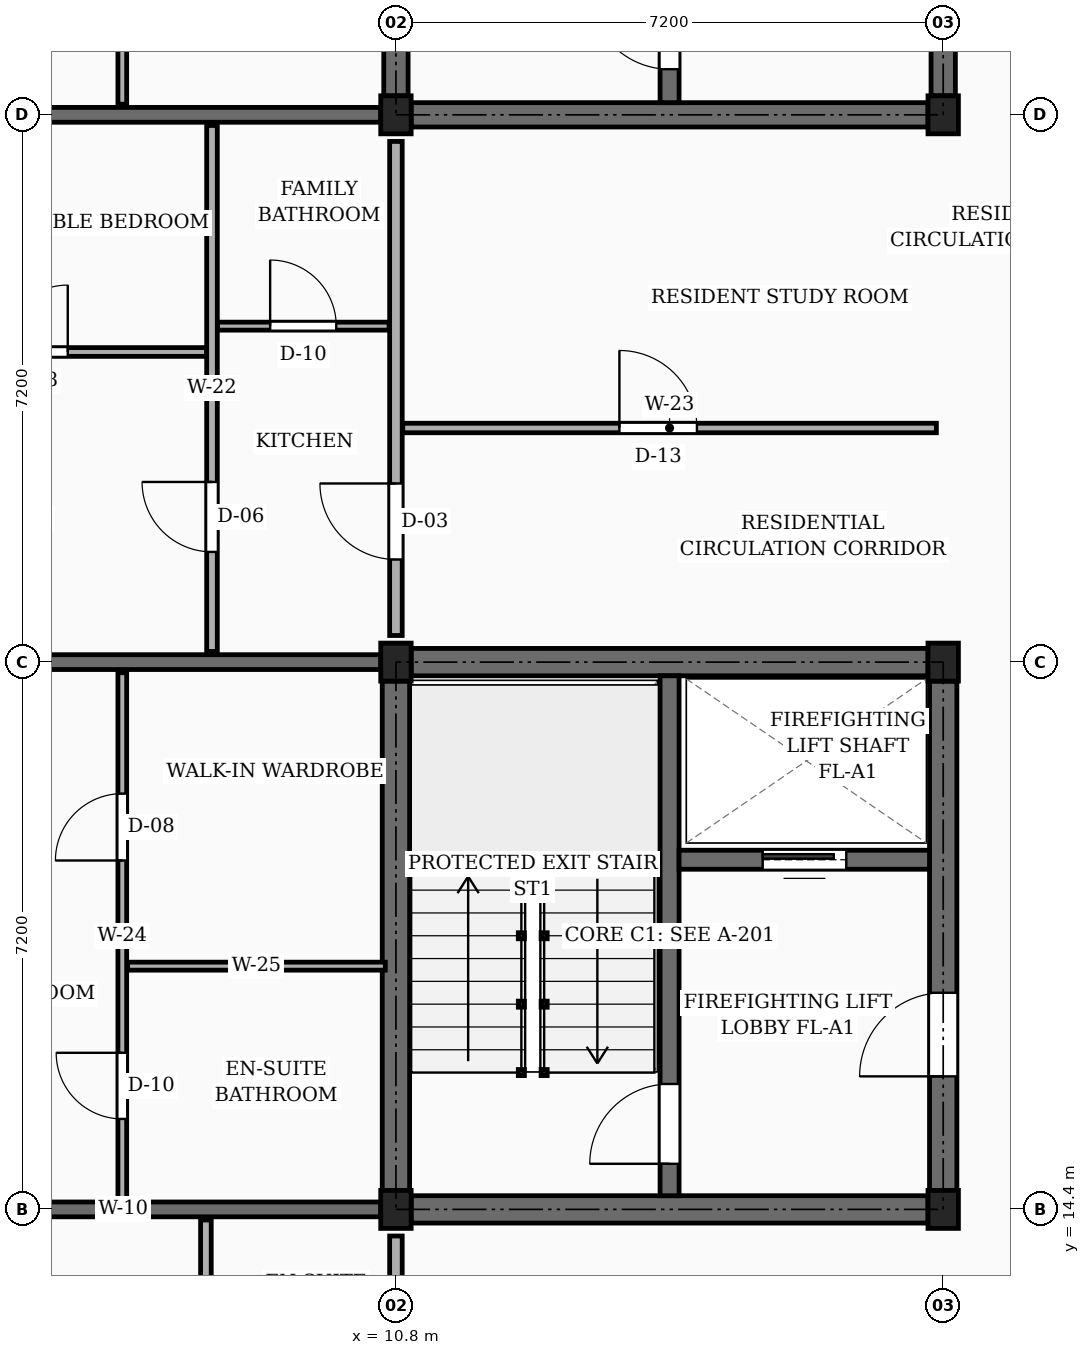
"""IFC4 building model, lengths in metres.
Left out: names, types, materials, properties, quantities, classifications, styles, units other than length and angle.
Written with IfcOpenShell. Run it as: python <this file> out.ifc"""

import sys

from ifc_helpers import new_model, si_unit, direction, frame, frame_2d, origin, origin_2d, place, context, subcontext, project, spatial, rectangle, extrude, element, fill, save


model = new_model("IFC4")
c1 = context("Model", 3, precision=1e-05, world=origin(), true_north=direction((0.0, 1.0)))
c2 = subcontext(c1, "Body", "Model", "MODEL_VIEW")
j1 = project(units=[si_unit("LENGTHUNIT", "METRE"), si_unit("PLANEANGLEUNIT", "RADIAN")], contexts=[c1])
p1 = place(None, origin())
s1 = spatial("IfcSite", under=j1, at=p1, CompositionType="ELEMENT")
p2 = place(p1, origin())
s2 = spatial("IfcBuilding", under=s1, at=p2, CompositionType="ELEMENT")
p3 = place(p2, frame((0.0, 0.0, 39.15)))
s3 = spatial("IfcBuildingStorey", under=s2, at=p3, CompositionType="ELEMENT", Elevation=39.15)
for number, where, z_axis, x_axis in (
    (1, (10.8, 14.4, 0.0), (0.0, 0.0, 1.0), (1.0, 0.0, 0.0)),
    (2, (10.8, 21.6, 0.0), (0.0, 0.0, 1.0), (1.0, 0.0, 0.0)),
    (3, (10.8, 28.8, 0.0), (0.0, 0.0, 1.0), (1.0, 0.0, 0.0)),
    (4, (18.0, 14.4, 0.0), (0.0, 0.0, 1.0), (1.0, 0.0, 0.0)),
    (5, (18.0, 21.6, 0.0), (0.0, 0.0, 1.0), (1.0, 0.0, 0.0)),
    (6, (18.0, 28.8, 0.0), (0.0, 0.0, 1.0), (1.0, 0.0, 0.0)),
):
    element("IfcColumn", number, at=place(p3, frame(where, z_axis=z_axis, x_axis=x_axis)), inside=s3, PredefinedType="COLUMN", context=c2, shape_type="SweptSolid", body=[
        extrude(rectangle(XDim=0.4, YDim=0.5, at=origin_2d()), origin(), (0.0, 0.0, 1.0), 3.15),
    ])
p4 = place(p3, frame((3.825, 14.4, 0.0), z_axis=(0.0, 0.0, 1.0), x_axis=(1.0, 0.0, 0.0)))
e7 = element("IfcWall", 7, at=p4, inside=s3, PredefinedType="SOLIDWALL", context=c2, shape_type="SweptSolid", body=[
    extrude(rectangle(XDim=6.775, YDim=0.195, at=frame_2d((3.388, 0.0))), origin(), (0.0, 0.0, 1.0), 2.17),
])
p5 = place(p4, frame((1.35, 0.0, 0.0)))
e8 = element("IfcOpeningElement", 8, at=p5, cuts=e7, PredefinedType="OPENING", context=c2, shape_type="SweptSolid", body=[
    extrude(rectangle(XDim=0.98, YDim=2.12, at=frame_2d((0.49, 1.06))), frame((0.0, 0.107, 0.0), z_axis=(0.0, -1.0, 0.0), x_axis=(1.0, 0.0, 0.0)), (0.0, 0.0, 1.0), 0.215),
])
p6 = place(p3, frame((3.825, 21.6, 0.0), z_axis=(0.0, 0.0, 1.0), x_axis=(1.0, 0.0, 0.0)))
e9 = element("IfcWall", 9, at=p6, inside=s3, PredefinedType="SOLIDWALL", context=c2, shape_type="SweptSolid", body=[
    extrude(rectangle(XDim=6.775, YDim=0.195, at=frame_2d((3.388, 0.0))), origin(), (0.0, 0.0, 1.0), 2.17),
])
p7 = place(p3, frame((3.825, 28.8, 0.0), z_axis=(0.0, 0.0, 1.0), x_axis=(1.0, 0.0, 0.0)))
e10 = element("IfcWall", 10, at=p7, inside=s3, PredefinedType="SOLIDWALL", context=c2, shape_type="SweptSolid", body=[
    extrude(rectangle(XDim=6.775, YDim=0.195, at=frame_2d((3.388, 0.0))), origin(), (0.0, 0.0, 1.0), 2.17),
])
p8 = place(p7, frame((1.35, 0.0, 0.0)))
e11 = element("IfcOpeningElement", 11, at=p8, cuts=e10, PredefinedType="OPENING", context=c2, shape_type="SweptSolid", body=[
    extrude(rectangle(XDim=0.98, YDim=2.12, at=frame_2d((0.49, 1.06))), frame((0.0, 0.107, 0.0), z_axis=(0.0, -1.0, 0.0), x_axis=(1.0, 0.0, 0.0)), (0.0, 0.0, 1.0), 0.215),
])
p9 = place(p3, frame((10.8, 14.65, 0.0), z_axis=(0.0, 0.0, 1.0), x_axis=(0.0, 1.0, 0.0)))
e12 = element("IfcWall", 12, at=p9, inside=s3, PredefinedType="SHEAR", context=c2, shape_type="SweptSolid", body=[
    extrude(rectangle(XDim=6.7, YDim=0.36, at=frame_2d((3.35, 0.0))), origin(), (0.0, 0.0, 1.0), 2.87),
])
p10 = place(p3, frame((11.0, 21.6, 0.0), z_axis=(0.0, 0.0, 1.0), x_axis=(1.0, 0.0, 0.0)))
e13 = element("IfcWall", 13, at=p10, inside=s3, PredefinedType="SHEAR", context=c2, shape_type="SweptSolid", body=[
    extrude(rectangle(XDim=6.8, YDim=0.36, at=frame_2d((3.4, 0.0))), origin(), (0.0, 0.0, 1.0), 2.87),
])
p11 = place(p3, frame((18.0, 14.65, 0.0), z_axis=(0.0, 0.0, 1.0), x_axis=(0.0, 1.0, 0.0)))
e14 = element("IfcWall", 14, at=p11, inside=s3, PredefinedType="SHEAR", context=c2, shape_type="SweptSolid", body=[
    extrude(rectangle(XDim=6.7, YDim=0.36, at=frame_2d((3.35, 0.0))), origin(), (0.0, 0.0, 1.0), 2.87),
])
p12 = place(p11, frame((1.5, 0.0, 0.0)))
e15 = element("IfcOpeningElement", 15, at=p12, cuts=e14, PredefinedType="OPENING", context=c2, shape_type="SweptSolid", body=[
    extrude(rectangle(XDim=1.1, YDim=2.15, at=frame_2d((0.55, 1.075))), frame((0.0, 0.19, 0.0), z_axis=(0.0, -1.0, 0.0), x_axis=(1.0, 0.0, 0.0)), (0.0, 0.0, 1.0), 0.38),
])
p13 = place(p3, frame((11.0, 14.4, 0.0), z_axis=(0.0, 0.0, 1.0), x_axis=(1.0, 0.0, 0.0)))
e16 = element("IfcWall", 16, at=p13, inside=s3, PredefinedType="SHEAR", context=c2, shape_type="SweptSolid", body=[
    extrude(rectangle(XDim=6.8, YDim=0.36, at=frame_2d((3.4, 0.0))), origin(), (0.0, 0.0, 1.0), 2.87),
])
p14 = place(p3, frame((14.4, 14.58, 0.0), z_axis=(0.0, 0.0, 1.0), x_axis=(0.0, 1.0, 0.0)))
e17 = element("IfcWall", 17, at=p14, inside=s3, PredefinedType="SHEAR", context=c2, shape_type="SweptSolid", body=[
    extrude(rectangle(XDim=6.84, YDim=0.25, at=frame_2d((3.42, 0.0))), origin(), (0.0, 0.0, 1.0), 2.87),
])
p15 = place(p14, frame((0.42, 0.0, 0.0)))
e18 = element("IfcOpeningElement", 18, at=p15, cuts=e17, PredefinedType="OPENING", context=c2, shape_type="SweptSolid", body=[
    extrude(rectangle(XDim=1.05, YDim=2.15, at=frame_2d((0.525, 1.075))), frame((0.0, 0.135, 0.0), z_axis=(0.0, -1.0, 0.0), x_axis=(1.0, 0.0, 0.0)), (0.0, 0.0, 1.0), 0.27),
])
p16 = place(p3, frame((14.525, 19.0, 0.0), z_axis=(0.0, 0.0, 1.0), x_axis=(1.0, 0.0, 0.0)))
e19 = element("IfcWall", 19, at=p16, inside=s3, PredefinedType="SHEAR", context=c2, shape_type="SweptSolid", body=[
    extrude(rectangle(XDim=3.295, YDim=0.25, at=frame_2d((1.647, 0.0))), origin(), (0.0, 0.0, 1.0), 2.87),
])
p17 = place(p16, frame((1.1, 0.0, 0.0)))
e20 = element("IfcOpeningElement", 20, at=p17, cuts=e19, PredefinedType="OPENING", context=c2, shape_type="SweptSolid", body=[
    extrude(rectangle(XDim=1.1, YDim=2.2, at=frame_2d((0.55, 1.1))), frame((0.0, 0.135, 0.0), z_axis=(0.0, -1.0, 0.0), x_axis=(1.0, 0.0, 0.0)), (0.0, 0.0, 1.0), 0.27),
])
p18 = place(p3, frame((10.8, 29.05, 0.0), z_axis=(0.0, 0.0, 1.0), x_axis=(0.0, 1.0, 0.0)))
e21 = element("IfcWall", 21, at=p18, inside=s3, PredefinedType="SHEAR", context=c2, shape_type="SweptSolid", body=[
    extrude(rectangle(XDim=6.7, YDim=0.32, at=frame_2d((3.35, 0.0))), origin(), (0.0, 0.0, 1.0), 2.87),
])
p19 = place(p3, frame((18.0, 29.05, 0.0), z_axis=(0.0, 0.0, 1.0), x_axis=(0.0, 1.0, 0.0)))
e22 = element("IfcWall", 22, at=p19, inside=s3, PredefinedType="SHEAR", context=c2, shape_type="SweptSolid", body=[
    extrude(rectangle(XDim=6.7, YDim=0.32, at=frame_2d((3.35, 0.0))), origin(), (0.0, 0.0, 1.0), 2.87),
])
p20 = place(p19, frame((1.5, 0.0, 0.0)))
e23 = element("IfcOpeningElement", 23, at=p20, cuts=e22, PredefinedType="OPENING", context=c2, shape_type="SweptSolid", body=[
    extrude(rectangle(XDim=1.1, YDim=2.15, at=frame_2d((0.55, 1.075))), frame((0.0, 0.17, 0.0), z_axis=(0.0, -1.0, 0.0), x_axis=(1.0, 0.0, 0.0)), (0.0, 0.0, 1.0), 0.34),
])
p21 = place(p3, frame((11.0, 28.8, 0.0), z_axis=(0.0, 0.0, 1.0), x_axis=(1.0, 0.0, 0.0)))
e24 = element("IfcWall", 24, at=p21, inside=s3, PredefinedType="SHEAR", context=c2, shape_type="SweptSolid", body=[
    extrude(rectangle(XDim=6.8, YDim=0.32, at=frame_2d((3.4, 0.0))), origin(), (0.0, 0.0, 1.0), 2.87),
])
p22 = place(p3, frame((14.4, 28.96, 0.0), z_axis=(0.0, 0.0, 1.0), x_axis=(0.0, 1.0, 0.0)))
e25 = element("IfcWall", 25, at=p22, inside=s3, PredefinedType="SHEAR", context=c2, shape_type="SweptSolid", body=[
    extrude(rectangle(XDim=6.88, YDim=0.25, at=frame_2d((3.44, 0.0))), origin(), (0.0, 0.0, 1.0), 2.87),
])
p23 = place(p22, frame((0.44, 0.0, 0.0)))
e26 = element("IfcOpeningElement", 26, at=p23, cuts=e25, PredefinedType="OPENING", context=c2, shape_type="SweptSolid", body=[
    extrude(rectangle(XDim=1.05, YDim=2.15, at=frame_2d((0.525, 1.075))), frame((0.0, 0.135, 0.0), z_axis=(0.0, -1.0, 0.0), x_axis=(1.0, 0.0, 0.0)), (0.0, 0.0, 1.0), 0.27),
])
p24 = place(p3, frame((10.8, 7.55, 0.0), z_axis=(0.0, 0.0, 1.0), x_axis=(0.0, 1.0, 0.0)))
e27 = element("IfcWall", 27, at=p24, inside=s3, PredefinedType="PARTITIONING", context=c2, shape_type="SweptSolid", body=[
    extrude(rectangle(XDim=6.5, YDim=0.165, at=frame_2d((3.25, 0.0))), origin(), (0.0, 0.0, 1.0), 2.305),
])
p25 = place(p24, frame((1.0, 0.0, 0.0)))
e28 = element("IfcOpeningElement", 28, at=p25, cuts=e27, PredefinedType="OPENING", context=c2, shape_type="SweptSolid", body=[
    extrude(rectangle(XDim=1.14, YDim=2.18, at=frame_2d((0.57, 1.09))), frame((0.0, 0.093, 0.0), z_axis=(0.0, -1.0, 0.0), x_axis=(1.0, 0.0, 0.0)), (0.0, 0.0, 1.0), 0.185),
])
p26 = place(p3, frame((10.8, 21.95, 0.0), z_axis=(0.0, 0.0, 1.0), x_axis=(0.0, 1.0, 0.0)))
e29 = element("IfcWall", 29, at=p26, inside=s3, PredefinedType="PARTITIONING", context=c2, shape_type="SweptSolid", body=[
    extrude(rectangle(XDim=6.5, YDim=0.165, at=frame_2d((3.25, 0.0))), origin(), (0.0, 0.0, 1.0), 2.305),
])
p27 = place(p26, frame((1.0, 0.0, 0.0)))
e30 = element("IfcOpeningElement", 30, at=p27, cuts=e29, PredefinedType="OPENING", context=c2, shape_type="SweptSolid", body=[
    extrude(rectangle(XDim=1.0, YDim=2.15, at=frame_2d((0.5, 1.075))), frame((0.0, 0.093, 0.0), z_axis=(0.0, -1.0, 0.0), x_axis=(1.0, 0.0, 0.0)), (0.0, 0.0, 1.0), 0.185),
])
p28 = place(p3, frame((8.3, 7.375, 0.0), z_axis=(0.0, 0.0, 1.0), x_axis=(0.0, 1.0, 0.0)))
e31 = element("IfcWall", 31, at=p28, inside=s3, PredefinedType="PARTITIONING", context=c2, shape_type="SweptSolid", body=[
    extrude(rectangle(XDim=6.885, YDim=0.14, at=frame_2d((3.442, 0.0))), origin(), (0.0, 0.0, 1.0), 2.305),
])
p29 = place(p28, frame((1.275, 0.0, 0.0)))
e32 = element("IfcOpeningElement", 32, at=p29, cuts=e31, PredefinedType="OPENING", context=c2, shape_type="SweptSolid", body=[
    extrude(rectangle(XDim=0.95, YDim=2.1, at=frame_2d((0.475, 1.05))), frame((0.0, 0.08, 0.0), z_axis=(0.0, -1.0, 0.0), x_axis=(1.0, 0.0, 0.0)), (0.0, 0.0, 1.0), 0.16),
])
p30 = place(p3, frame((7.2, 14.54, 0.0), z_axis=(0.0, 0.0, 1.0), x_axis=(0.0, 1.0, 0.0)))
e33 = element("IfcWall", 33, at=p30, inside=s3, PredefinedType="PARTITIONING", context=c2, shape_type="SweptSolid", body=[
    extrude(rectangle(XDim=6.92, YDim=0.115, at=frame_2d((3.46, 0.0))), origin(), (0.0, 0.0, 1.0), 2.305),
])
p31 = place(p30, frame((1.05, 0.0, 0.0)))
e34 = element("IfcOpeningElement", 34, at=p31, cuts=e33, PredefinedType="OPENING", context=c2, shape_type="SweptSolid", body=[
    extrude(rectangle(XDim=0.87, YDim=2.05, at=frame_2d((0.435, 1.025))), frame((0.0, 0.067, 0.0), z_axis=(0.0, -1.0, 0.0), x_axis=(1.0, 0.0, 0.0)), (0.0, 0.0, 1.0), 0.135),
])
p32 = place(p30, frame((4.45, 0.0, 0.0)))
e35 = element("IfcOpeningElement", 35, at=p32, cuts=e33, PredefinedType="OPENING", context=c2, shape_type="SweptSolid", body=[
    extrude(rectangle(XDim=0.88, YDim=2.08, at=frame_2d((0.44, 1.04))), frame((0.0, 0.067, 0.0), z_axis=(0.0, -1.0, 0.0), x_axis=(1.0, 0.0, 0.0)), (0.0, 0.0, 1.0), 0.135),
])
p33 = place(p3, frame((7.27, 17.6, 0.0), z_axis=(0.0, 0.0, 1.0), x_axis=(1.0, 0.0, 0.0)))
e36 = element("IfcWall", 36, at=p33, inside=s3, PredefinedType="PARTITIONING", context=c2, shape_type="SweptSolid", body=[
    extrude(rectangle(XDim=3.39, YDim=0.105, at=frame_2d((1.695, 0.0))), origin(), (0.0, 0.0, 1.0), 2.305),
])
p34 = place(p3, frame((10.89, 24.68, 0.0), z_axis=(0.0, 0.0, 1.0), x_axis=(1.0, 0.0, 0.0)))
e37 = element("IfcWall", 37, at=p34, inside=s3, PredefinedType="PARTITIONING", context=c2, shape_type="SweptSolid", body=[
    extrude(rectangle(XDim=7.02, YDim=0.125, at=frame_2d((3.51, 0.0))), origin(), (0.0, 0.0, 1.0), 2.305),
])
p35 = place(p34, frame((2.85, 0.0, 0.0)))
e38 = element("IfcOpeningElement", 38, at=p35, cuts=e37, PredefinedType="OPENING", context=c2, shape_type="SweptSolid", body=[
    extrude(rectangle(XDim=1.02, YDim=2.15, at=frame_2d((0.51, 1.075))), frame((0.0, 0.073, 0.0), z_axis=(0.0, -1.0, 0.0), x_axis=(1.0, 0.0, 0.0)), (0.0, 0.0, 1.0), 0.145),
])
p36 = place(p3, frame((3.775, 25.68, 0.0), z_axis=(0.0, 0.0, 1.0), x_axis=(1.0, 0.0, 0.0)))
e39 = element("IfcWall", 39, at=p36, inside=s3, PredefinedType="PARTITIONING", context=c2, shape_type="SweptSolid", body=[
    extrude(rectangle(XDim=4.535, YDim=0.115, at=frame_2d((2.268, 0.0))), origin(), (0.0, 0.0, 1.0), 2.305),
])
p37 = place(p36, frame((1.827, 0.0, 0.0)))
e40 = element("IfcOpeningElement", 40, at=p37, cuts=e39, PredefinedType="OPENING", context=c2, shape_type="SweptSolid", body=[
    extrude(rectangle(XDim=0.88, YDim=2.08, at=frame_2d((0.44, 1.04))), frame((0.0, 0.067, 0.0), z_axis=(0.0, -1.0, 0.0), x_axis=(1.0, 0.0, 0.0)), (0.0, 0.0, 1.0), 0.135),
])
p38 = place(p3, frame((8.45, 26.02, 0.0), z_axis=(0.0, 0.0, 1.0), x_axis=(1.0, 0.0, 0.0)))
e41 = element("IfcWall", 41, at=p38, inside=s3, PredefinedType="PARTITIONING", context=c2, shape_type="SweptSolid", body=[
    extrude(rectangle(XDim=2.26, YDim=0.105, at=frame_2d((1.13, 0.0))), origin(), (0.0, 0.0, 1.0), 2.305),
])
p39 = place(p38, frame((0.695, 0.0, 0.0)))
e42 = element("IfcOpeningElement", 42, at=p39, cuts=e41, PredefinedType="OPENING", context=c2, shape_type="SweptSolid", body=[
    extrude(rectangle(XDim=0.87, YDim=2.05, at=frame_2d((0.435, 1.025))), frame((0.0, 0.062, 0.0), z_axis=(0.0, -1.0, 0.0), x_axis=(1.0, 0.0, 0.0)), (0.0, 0.0, 1.0), 0.125),
])
p40 = place(p3, frame((8.38, 21.74, 0.0), z_axis=(0.0, 0.0, 1.0), x_axis=(0.0, 1.0, 0.0)))
e43 = element("IfcWall", 43, at=p40, inside=s3, PredefinedType="PARTITIONING", context=c2, shape_type="SweptSolid", body=[
    extrude(rectangle(XDim=6.92, YDim=0.14, at=frame_2d((3.46, 0.0))), origin(), (0.0, 0.0, 1.0), 2.305),
])
p41 = place(p40, frame((1.31, 0.0, 0.0)))
e44 = element("IfcOpeningElement", 44, at=p41, cuts=e43, PredefinedType="OPENING", context=c2, shape_type="SweptSolid", body=[
    extrude(rectangle(XDim=0.92, YDim=2.1, at=frame_2d((0.46, 1.05))), frame((0.0, 0.08, 0.0), z_axis=(0.0, -1.0, 0.0), x_axis=(1.0, 0.0, 0.0)), (0.0, 0.0, 1.0), 0.16),
])
p42 = place(p3, frame((7.2, 28.94, 0.0), z_axis=(0.0, 0.0, 1.0), x_axis=(0.0, 1.0, 0.0)))
e45 = element("IfcWall", 45, at=p42, inside=s3, PredefinedType="PARTITIONING", context=c2, shape_type="SweptSolid", body=[
    extrude(rectangle(XDim=6.92, YDim=0.115, at=frame_2d((3.46, 0.0))), origin(), (0.0, 0.0, 1.0), 2.305),
])
p43 = place(p42, frame((1.05, 0.0, 0.0)))
e46 = element("IfcOpeningElement", 46, at=p43, cuts=e45, PredefinedType="OPENING", context=c2, shape_type="SweptSolid", body=[
    extrude(rectangle(XDim=0.87, YDim=2.05, at=frame_2d((0.435, 1.025))), frame((0.0, 0.067, 0.0), z_axis=(0.0, -1.0, 0.0), x_axis=(1.0, 0.0, 0.0)), (0.0, 0.0, 1.0), 0.135),
])
p44 = place(p42, frame((4.45, 0.0, 0.0)))
e47 = element("IfcOpeningElement", 47, at=p44, cuts=e45, PredefinedType="OPENING", context=c2, shape_type="SweptSolid", body=[
    extrude(rectangle(XDim=0.88, YDim=2.08, at=frame_2d((0.44, 1.04))), frame((0.0, 0.067, 0.0), z_axis=(0.0, -1.0, 0.0), x_axis=(1.0, 0.0, 0.0)), (0.0, 0.0, 1.0), 0.135),
])
p45 = place(p12, frame((1.1, 0.0, 0.0), z_axis=(0.0, 0.0, 1.0), x_axis=(-1.0, 0.0, 0.0)))
e48 = element("IfcDoor", 48, at=p45, inside=s3, OperationType="SINGLE_SWING_LEFT", PredefinedType="DOOR", context=c2, shape_type="SweptSolid", body=[
    extrude(rectangle(XDim=1.1, YDim=2.15, at=frame_2d((0.55, 1.075))), frame((0.0, 0.025, 0.0), z_axis=(0.0, -1.0, 0.0), x_axis=(1.0, 0.0, 0.0)), (0.0, 0.0, 1.0), 0.05),
])
fill(e15, e48)
p46 = place(p15, origin())
e49 = element("IfcDoor", 49, at=p46, inside=s3, OperationType="SINGLE_SWING_LEFT", PredefinedType="DOOR", context=c2, shape_type="SweptSolid", body=[
    extrude(rectangle(XDim=1.05, YDim=2.15, at=frame_2d((0.525, 1.075))), frame((0.0, 0.025, 0.0), z_axis=(0.0, -1.0, 0.0), x_axis=(1.0, 0.0, 0.0)), (0.0, 0.0, 1.0), 0.05),
])
fill(e18, e49)
p47 = place(p17, origin())
e50 = element("IfcDoor", 50, at=p47, inside=s3, OperationType="SLIDING_TO_LEFT", PredefinedType="DOOR", context=c2, shape_type="SweptSolid", body=[
    extrude(rectangle(XDim=1.1, YDim=2.2, at=frame_2d((0.55, 1.1))), frame((0.0, 0.025, 0.0), z_axis=(0.0, -1.0, 0.0), x_axis=(1.0, 0.0, 0.0)), (0.0, 0.0, 1.0), 0.05),
])
fill(e20, e50)
p48 = place(p23, origin())
e51 = element("IfcDoor", 51, at=p48, inside=s3, OperationType="SINGLE_SWING_RIGHT", PredefinedType="DOOR", context=c2, shape_type="SweptSolid", body=[
    extrude(rectangle(XDim=1.05, YDim=2.15, at=frame_2d((0.525, 1.075))), frame((0.0, 0.025, 0.0), z_axis=(0.0, -1.0, 0.0), x_axis=(1.0, 0.0, 0.0)), (0.0, 0.0, 1.0), 0.05),
])
fill(e26, e51)
p49 = place(p27, origin())
e52 = element("IfcDoor", 52, at=p49, inside=s3, OperationType="SINGLE_SWING_RIGHT", PredefinedType="DOOR", context=c2, shape_type="SweptSolid", body=[
    extrude(rectangle(XDim=1.0, YDim=2.15, at=frame_2d((0.5, 1.075))), frame((0.0, 0.025, 0.0), z_axis=(0.0, -1.0, 0.0), x_axis=(1.0, 0.0, 0.0)), (0.0, 0.0, 1.0), 0.05),
])
fill(e30, e52)
p50 = place(p31, origin())
e53 = element("IfcDoor", 53, at=p50, inside=s3, OperationType="SINGLE_SWING_RIGHT", PredefinedType="DOOR", context=c2, shape_type="SweptSolid", body=[
    extrude(rectangle(XDim=0.87, YDim=2.05, at=frame_2d((0.435, 1.025))), frame((0.0, 0.025, 0.0), z_axis=(0.0, -1.0, 0.0), x_axis=(1.0, 0.0, 0.0)), (0.0, 0.0, 1.0), 0.05),
])
fill(e34, e53)
p51 = place(p32, origin())
e54 = element("IfcDoor", 54, at=p51, inside=s3, OperationType="SINGLE_SWING_LEFT", PredefinedType="DOOR", context=c2, shape_type="SweptSolid", body=[
    extrude(rectangle(XDim=0.88, YDim=2.08, at=frame_2d((0.44, 1.04))), frame((0.0, 0.025, 0.0), z_axis=(0.0, -1.0, 0.0), x_axis=(1.0, 0.0, 0.0)), (0.0, 0.0, 1.0), 0.05),
])
fill(e35, e54)
p52 = place(p35, origin())
e55 = element("IfcDoor", 55, at=p52, inside=s3, OperationType="SINGLE_SWING_LEFT", PredefinedType="DOOR", context=c2, shape_type="SweptSolid", body=[
    extrude(rectangle(XDim=1.02, YDim=2.15, at=frame_2d((0.51, 1.075))), frame((0.0, 0.025, 0.0), z_axis=(0.0, -1.0, 0.0), x_axis=(1.0, 0.0, 0.0)), (0.0, 0.0, 1.0), 0.05),
])
fill(e38, e55)
p53 = place(p37, origin())
e56 = element("IfcDoor", 56, at=p53, inside=s3, OperationType="SINGLE_SWING_RIGHT", PredefinedType="DOOR", context=c2, shape_type="SweptSolid", body=[
    extrude(rectangle(XDim=0.88, YDim=2.08, at=frame_2d((0.44, 1.04))), frame((0.0, 0.025, 0.0), z_axis=(0.0, -1.0, 0.0), x_axis=(1.0, 0.0, 0.0)), (0.0, 0.0, 1.0), 0.05),
])
fill(e40, e56)
p54 = place(p39, origin())
e57 = element("IfcDoor", 57, at=p54, inside=s3, OperationType="SINGLE_SWING_LEFT", PredefinedType="DOOR", context=c2, shape_type="SweptSolid", body=[
    extrude(rectangle(XDim=0.87, YDim=2.05, at=frame_2d((0.435, 1.025))), frame((0.0, 0.025, 0.0), z_axis=(0.0, -1.0, 0.0), x_axis=(1.0, 0.0, 0.0)), (0.0, 0.0, 1.0), 0.05),
])
fill(e42, e57)
p55 = place(p41, origin())
e58 = element("IfcDoor", 58, at=p55, inside=s3, OperationType="SINGLE_SWING_RIGHT", PredefinedType="DOOR", context=c2, shape_type="SweptSolid", body=[
    extrude(rectangle(XDim=0.92, YDim=2.1, at=frame_2d((0.46, 1.05))), frame((0.0, 0.025, 0.0), z_axis=(0.0, -1.0, 0.0), x_axis=(1.0, 0.0, 0.0)), (0.0, 0.0, 1.0), 0.05),
])
fill(e44, e58)
save(model, sys.argv[1])
